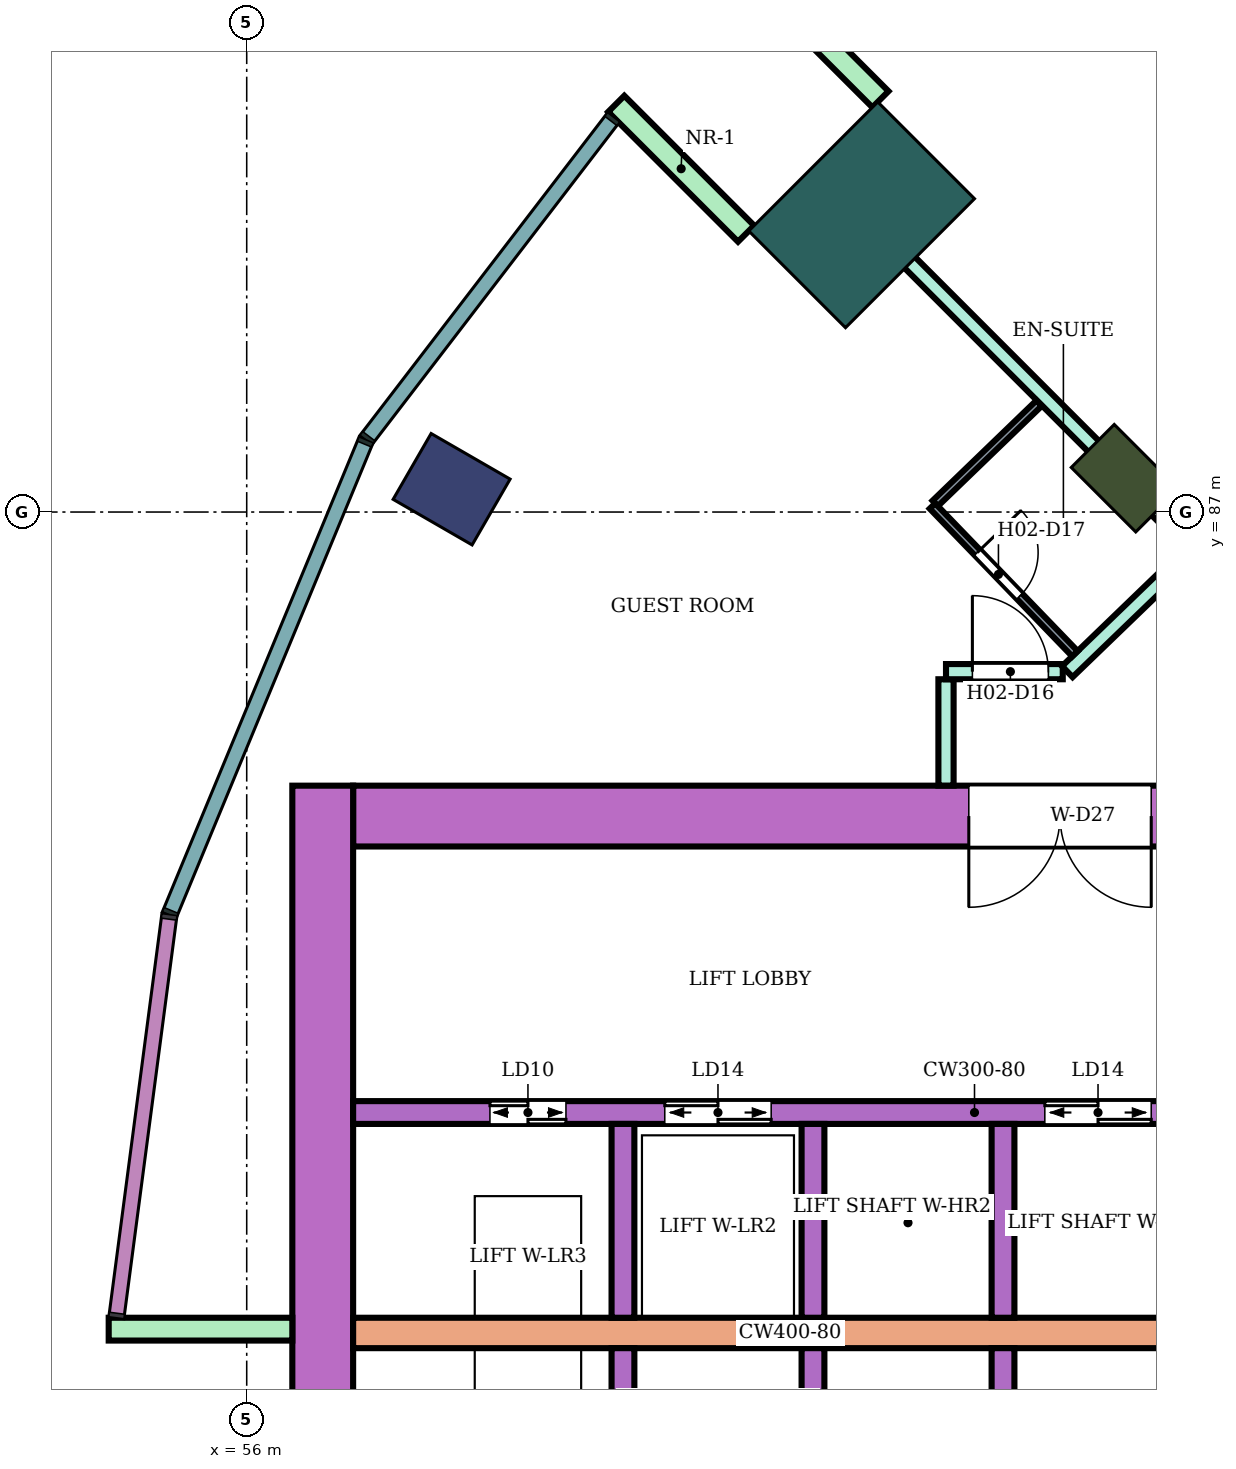
"""IFC4 building model, lengths in metres.
Left out: names, types, materials, properties, quantities, classifications, styles, units other than length and angle.
Written with IfcOpenShell. Run it as: python <this file> out.ifc"""

import sys

from ifc_helpers import new_model, si_unit, direction, frame, frame_2d, origin, origin_2d, place, context, subcontext, project, spatial, rectangle, extrude, element, fill, save


model = new_model("IFC4")
c1 = context("Model", 3, precision=1e-05, world=origin(), true_north=direction((0.0, 1.0)))
c2 = subcontext(c1, "Body", "Model", "MODEL_VIEW")
j1 = project(units=[si_unit("LENGTHUNIT", "METRE"), si_unit("PLANEANGLEUNIT", "RADIAN")], contexts=[c1])
p1 = place(None, origin())
s1 = spatial("IfcSite", under=j1, at=p1, CompositionType="ELEMENT")
p2 = place(p1, origin())
s2 = spatial("IfcBuilding", under=s1, at=p2, CompositionType="ELEMENT")
p3 = place(p2, frame((0.0, 0.0, 44.0)))
s3 = spatial("IfcBuildingStorey", under=s2, at=p3, CompositionType="ELEMENT", Elevation=44.0)
p4 = place(p3, frame((58.696, 87.3, 0.0), z_axis=(0.0, 0.0, 1.0), x_axis=(-0.866025403784, 0.5, 0.0)))
e1 = element("IfcColumn", 1, at=p4, inside=s3, PredefinedType="COLUMN", context=c2, shape_type="SweptSolid", body=[
    extrude(rectangle(XDim=1.2, YDim=1.0, at=origin_2d()), origin(), (0.0, 0.0, 1.0), 3.8),
])
p5 = place(p3, frame((67.555, 87.445, 0.0), z_axis=(0.0, 0.0, 1.0), x_axis=(-0.707106781187, 0.707106781187, 0.0)))
e2 = element("IfcColumn", 2, at=p5, inside=s3, PredefinedType="COLUMN", context=c2, shape_type="SweptSolid", body=[
    extrude(rectangle(XDim=1.2, YDim=0.8, at=origin_2d()), origin(), (0.0, 0.0, 1.0), 3.8),
])
p6 = place(p3, frame((64.09, 90.91, 0.0), z_axis=(0.0, 0.0, 1.0), x_axis=(-0.707106781187, 0.707106781187, 0.0)))
e3 = element("IfcColumn", 3, at=p6, inside=s3, PredefinedType="COLUMN", context=c2, shape_type="SweptSolid", body=[
    extrude(rectangle(XDim=1.8, YDim=2.4, at=origin_2d()), origin(), (0.0, 0.0, 1.0), 3.8),
])
p7 = place(p3, frame((72.1, 83.0, 0.0), z_axis=(0.0, 0.0, 1.0), x_axis=(-1.0, 0.0, 0.0)))
e4 = element("IfcWall", 4, at=p7, inside=s3, PredefinedType="SHEAR", context=c2, shape_type="SweptSolid", body=[
    extrude(rectangle(XDim=14.7, YDim=0.8, at=frame_2d((7.35, 0.0))), origin(), (0.0, 0.0, 1.0), 3.48),
])
p8 = place(p7, frame((4.2, 0.0, 0.0)))
e5 = element("IfcOpeningElement", 5, at=p8, cuts=e4, PredefinedType="OPENING", context=c2, shape_type="SweptSolid", body=[
    extrude(rectangle(XDim=2.4, YDim=2.4, at=frame_2d((1.2, 1.2))), frame((0.0, 0.41, 0.0), z_axis=(0.0, -1.0, 0.0), x_axis=(1.0, 0.0, 0.0)), (0.0, 0.0, 1.0), 0.82),
])
p9 = place(p3, frame((57.0, 83.4, 0.0), z_axis=(0.0, 0.0, 1.0), x_axis=(0.0, -1.0, 0.0)))
e6 = element("IfcWall", 6, at=p9, inside=s3, PredefinedType="SHEAR", context=c2, shape_type="SweptSolid", body=[
    extrude(rectangle(XDim=16.8, YDim=0.8, at=frame_2d((8.4, 0.0))), origin(), (0.0, 0.0, 1.0), 3.48),
])
p10 = place(p3, frame((68.3, 76.2, 0.0), z_axis=(0.0, 0.0, 1.0), x_axis=(-1.0, 0.0, 0.0)))
e7 = element("IfcWall", 7, at=p10, inside=s3, PredefinedType="SHEAR", context=c2, shape_type="SweptSolid", body=[
    extrude(rectangle(XDim=10.9, YDim=0.4, at=frame_2d((5.45, 0.0))), origin(), (0.0, 0.0, 1.0), 3.48),
])
p11 = place(p3, frame((68.3, 79.1, 0.0), z_axis=(0.0, 0.0, 1.0), x_axis=(-1.0, 0.0, 0.0)))
e8 = element("IfcWall", 8, at=p11, inside=s3, PredefinedType="SHEAR", context=c2, shape_type="SweptSolid", body=[
    extrude(rectangle(XDim=10.9, YDim=0.3, at=frame_2d((5.45, 0.0))), origin(), (0.0, 0.0, 1.0), 3.48),
])
p12 = place(p11, frame((0.4, 0.0, 0.0)))
e9 = element("IfcOpeningElement", 9, at=p12, cuts=e8, PredefinedType="OPENING", context=c2, shape_type="SweptSolid", body=[
    extrude(rectangle(XDim=1.4, YDim=2.1, at=frame_2d((0.7, 1.05))), frame((0.0, 0.16, 0.0), z_axis=(0.0, -1.0, 0.0), x_axis=(1.0, 0.0, 0.0)), (0.0, 0.0, 1.0), 0.32),
])
p13 = place(p11, frame((5.4, 0.0, 0.0)))
e10 = element("IfcOpeningElement", 10, at=p13, cuts=e8, PredefinedType="OPENING", context=c2, shape_type="SweptSolid", body=[
    extrude(rectangle(XDim=1.4, YDim=2.1, at=frame_2d((0.7, 1.05))), frame((0.0, 0.16, 0.0), z_axis=(0.0, -1.0, 0.0), x_axis=(1.0, 0.0, 0.0)), (0.0, 0.0, 1.0), 0.32),
])
p14 = place(p11, frame((8.1, 0.0, 0.0)))
e11 = element("IfcOpeningElement", 11, at=p14, cuts=e8, PredefinedType="OPENING", context=c2, shape_type="SweptSolid", body=[
    extrude(rectangle(XDim=1.0, YDim=2.1, at=frame_2d((0.5, 1.05))), frame((0.0, 0.16, 0.0), z_axis=(0.0, -1.0, 0.0), x_axis=(1.0, 0.0, 0.0)), (0.0, 0.0, 1.0), 0.32),
])
for number, where, z_axis, x_axis in (
    (12, (65.95, 76.0, 0.0), (0.0, 0.0, 1.0), (0.0, -1.0, 0.0)),
    (13, (63.45, 76.0, 0.0), (0.0, 0.0, 1.0), (0.0, -1.0, 0.0)),
    (14, (60.95, 76.0, 0.0), (0.0, 0.0, 1.0), (0.0, -1.0, 0.0)),
    (15, (65.95, 78.95, 0.0), (0.0, 0.0, 1.0), (0.0, -1.0, 0.0)),
    (16, (63.45, 78.95, 0.0), (0.0, 0.0, 1.0), (0.0, -1.0, 0.0)),
    (17, (60.95, 78.95, 0.0), (0.0, 0.0, 1.0), (0.0, -1.0, 0.0)),
):
    element("IfcWall", number, at=place(p3, frame(where, z_axis=z_axis, x_axis=x_axis)), inside=s3, PredefinedType="SHEAR", context=c2, shape_type="SweptSolid", body=[
        extrude(rectangle(XDim=2.55, YDim=0.3, at=frame_2d((1.275, 0.0))), origin(), (0.0, 0.0, 1.0), 3.48),
    ])
for number, where, z_axis, x_axis in (
    (18, (64.338, 92.43, 0.0), (0.0, 0.0, 1.0), (-0.707, 0.707, 0.0)),
    (19, (62.57, 90.662, 0.0), (0.0, 0.0, 1.0), (-0.707, 0.707, 0.0)),
    (20, (56.6, 76.25, 0.0), (0.0, 0.0, 1.0), (-1.0, 0.0, 0.0)),
):
    element("IfcWall", number, at=place(p3, frame(where, z_axis=z_axis, x_axis=x_axis)), inside=s3, PredefinedType="NOTDEFINED", context=c2, shape_type="SweptSolid", body=[
        extrude(rectangle(XDim=2.416, YDim=0.3, at=frame_2d((1.208, 0.0))), origin(), (0.0, 0.0, 1.0), 3.8),
    ])
p15 = place(p3, frame((63.599, 91.408, 0.0), z_axis=(0.0, 0.0, 1.0), x_axis=(0.706981017422, -0.707232522587, 0.0)))
e21 = element("IfcWall", 21, at=p15, inside=s3, PredefinedType="PARTITIONING", context=c2, shape_type="SweptSolid", body=[
    extrude(rectangle(XDim=6.795, YDim=0.2, at=frame_2d((3.397, 0.0))), origin(), (0.0, 0.0, 1.0), 3.35),
])
p16 = place(p3, frame((65.2, 83.401, 0.0), z_axis=(0.0, 0.0, 1.0), x_axis=(0.0, 1.0, 0.0)))
e22 = element("IfcWall", 22, at=p16, inside=s3, PredefinedType="PARTITIONING", context=c2, shape_type="SweptSolid", body=[
    extrude(rectangle(XDim=1.399, YDim=0.2, at=frame_2d((0.7, 0.0))), origin(), (0.0, 0.0, 1.0), 3.35),
])
p17 = place(p3, frame((65.2, 84.9, 0.0), z_axis=(0.0, 0.0, 1.0), x_axis=(1.0, 0.0, 0.0)))
e23 = element("IfcWall", 23, at=p17, inside=s3, PredefinedType="PARTITIONING", context=c2, shape_type="SweptSolid", body=[
    extrude(rectangle(XDim=1.536, YDim=0.2, at=frame_2d((0.768, 0.0))), origin(), (0.0, 0.0, 1.0), 3.35),
])
p18 = place(p17, frame((0.347, 0.0, 0.0)))
e24 = element("IfcOpeningElement", 24, at=p18, cuts=e23, PredefinedType="OPENING", context=c2, shape_type="SweptSolid", body=[
    extrude(rectangle(XDim=1.0, YDim=2.1, at=frame_2d((0.5, 1.05))), frame((0.0, 0.11, 0.0), z_axis=(0.0, -1.0, 0.0), x_axis=(1.0, 0.0, 0.0)), (0.0, 0.0, 1.0), 0.22),
])
p19 = place(p3, frame((66.796, 84.9, 0.0), z_axis=(0.0, 0.0, 1.0), x_axis=(0.719690131178, 0.694295409092, 0.0)))
e25 = element("IfcWall", 25, at=p19, inside=s3, PredefinedType="PARTITIONING", context=c2, shape_type="SweptSolid", body=[
    extrude(rectangle(XDim=6.585, YDim=0.2, at=frame_2d((3.293, 0.0))), origin(), (0.0, 0.0, 1.0), 3.35),
])
p20 = place(p19, frame((2.867, 0.0, 0.0)))
e26 = element("IfcOpeningElement", 26, at=p20, cuts=e25, PredefinedType="OPENING", context=c2, shape_type="SweptSolid", body=[
    extrude(rectangle(XDim=1.0, YDim=2.1, at=frame_2d((0.5, 1.05))), frame((0.0, 0.11, 0.0), z_axis=(0.0, -1.0, 0.0), x_axis=(1.0, 0.0, 0.0)), (0.0, 0.0, 1.0), 0.22),
])
p21 = place(p3, frame((67.103, 97.343, 0.0), z_axis=(0.0, 0.0, 1.0), x_axis=(0.499900389553, -0.866082906265, 0.0)))
e27 = element("IfcWall", 27, at=p21, inside=s3, PredefinedType="PARTITIONING", context=c2, shape_type="SweptSolid", body=[
    extrude(rectangle(XDim=8.908, YDim=0.2, at=frame_2d((4.454, 0.0))), origin(), (0.0, 0.0, 1.0), 3.35),
])
p22 = place(p3, frame((65.058, 87.114, 0.0), z_axis=(0.0, 0.0, 1.0), x_axis=(0.719715847356, 0.694268751324, 0.0)))
e28 = element("IfcWall", 28, at=p22, inside=s3, PredefinedType="PARTITIONING", context=c2, shape_type="SweptSolid", body=[
    extrude(rectangle(XDim=1.9, YDim=0.1, at=frame_2d((0.95, 0.0))), origin(), (0.0, 0.0, 1.0), 3.35),
])
p23 = place(p3, frame((65.022, 87.079, 0.0), z_axis=(0.0, 0.0, 1.0), x_axis=(0.694287838235, -0.719697434815, 0.0)))
e29 = element("IfcWall", 29, at=p23, inside=s3, PredefinedType="PARTITIONING", context=c2, shape_type="SweptSolid", body=[
    extrude(rectangle(XDim=2.7, YDim=0.1, at=frame_2d((1.35, 0.0))), origin(), (0.0, 0.0, 1.0), 3.35),
])
p24 = place(p23, frame((0.85, 0.0, 0.0)))
e30 = element("IfcOpeningElement", 30, at=p24, cuts=e29, PredefinedType="OPENING", context=c2, shape_type="SweptSolid", body=[
    extrude(rectangle(XDim=0.8, YDim=2.1, at=frame_2d((0.4, 1.05))), frame((0.0, 0.06, 0.0), z_axis=(0.0, -1.0, 0.0), x_axis=(1.0, 0.0, 0.0)), (0.0, 0.0, 1.0), 0.12),
])
p25 = place(p18, origin())
e31 = element("IfcDoor", 31, at=p25, inside=s3, OperationType="SINGLE_SWING_LEFT", PredefinedType="DOOR", context=c2, shape_type="SweptSolid", body=[
    extrude(rectangle(XDim=1.0, YDim=2.1, at=frame_2d((0.5, 1.05))), frame((0.0, 0.025, 0.0), z_axis=(0.0, -1.0, 0.0), x_axis=(1.0, 0.0, 0.0)), (0.0, 0.0, 1.0), 0.05),
])
fill(e24, e31)
p26 = place(p24, origin())
e32 = element("IfcDoor", 32, at=p26, inside=s3, OperationType="SINGLE_SWING_LEFT", PredefinedType="DOOR", context=c2, shape_type="SweptSolid", body=[
    extrude(rectangle(XDim=0.8, YDim=2.1, at=frame_2d((0.4, 1.05))), frame((0.0, 0.025, 0.0), z_axis=(0.0, -1.0, 0.0), x_axis=(1.0, 0.0, 0.0)), (0.0, 0.0, 1.0), 0.05),
])
fill(e30, e32)
p27 = place(p12, origin())
e33 = element("IfcDoor", 33, at=p27, inside=s3, OperationType="DOUBLE_DOOR_SLIDING", PredefinedType="DOOR", context=c2, shape_type="SweptSolid", body=[
    extrude(rectangle(XDim=1.4, YDim=2.1, at=frame_2d((0.7, 1.05))), frame((0.0, 0.025, 0.0), z_axis=(0.0, -1.0, 0.0), x_axis=(1.0, 0.0, 0.0)), (0.0, 0.0, 1.0), 0.05),
])
fill(e9, e33)
p28 = place(p13, origin())
e34 = element("IfcDoor", 34, at=p28, inside=s3, OperationType="DOUBLE_DOOR_SLIDING", PredefinedType="DOOR", context=c2, shape_type="SweptSolid", body=[
    extrude(rectangle(XDim=1.4, YDim=2.1, at=frame_2d((0.7, 1.05))), frame((0.0, 0.025, 0.0), z_axis=(0.0, -1.0, 0.0), x_axis=(1.0, 0.0, 0.0)), (0.0, 0.0, 1.0), 0.05),
])
fill(e10, e34)
p29 = place(p14, origin())
e35 = element("IfcDoor", 35, at=p29, inside=s3, OperationType="DOUBLE_DOOR_SLIDING", PredefinedType="DOOR", context=c2, shape_type="SweptSolid", body=[
    extrude(rectangle(XDim=1.0, YDim=2.1, at=frame_2d((0.5, 1.05))), frame((0.0, 0.025, 0.0), z_axis=(0.0, -1.0, 0.0), x_axis=(1.0, 0.0, 0.0)), (0.0, 0.0, 1.0), 0.05),
])
fill(e11, e35)
p30 = place(p8, origin())
e36 = element("IfcDoor", 36, at=p30, inside=s3, OperationType="DOUBLE_DOOR_SINGLE_SWING", PredefinedType="DOOR", context=c2, shape_type="SweptSolid", body=[
    extrude(rectangle(XDim=2.4, YDim=2.4, at=frame_2d((1.2, 1.2))), frame((0.0, 0.025, 0.0), z_axis=(0.0, -1.0, 0.0), x_axis=(1.0, 0.0, 0.0)), (0.0, 0.0, 1.0), 0.05),
])
fill(e5, e36)
save(model, sys.argv[1])
